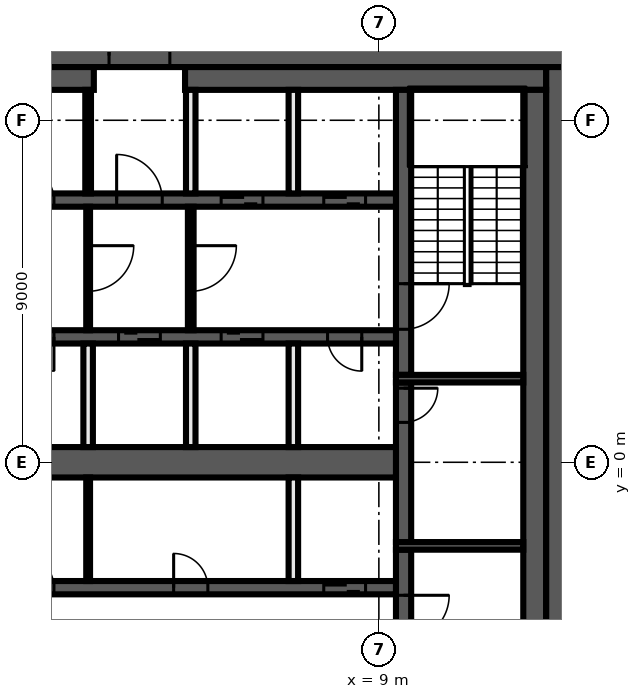
"""IFC4 building model, lengths in metres.
Left out: names, types, materials, properties, quantities, classifications, styles, units other than length and angle.
Written with IfcOpenShell. Run it as: python <this file> out.ifc"""

import sys

from ifc_helpers import new_model, si_unit, direction, frame, frame_2d, origin, place, context, subcontext, project, spatial, rectangle, extrude, element, fill, save


model = new_model("IFC4")
c1 = context("Model", 3, precision=1e-05, world=origin(), true_north=direction((0.0, 1.0)))
c2 = subcontext(c1, "Body", "Model", "MODEL_VIEW")
j1 = project(units=[si_unit("LENGTHUNIT", "METRE"), si_unit("PLANEANGLEUNIT", "RADIAN")], contexts=[c1])
p1 = place(None, origin())
s1 = spatial("IfcSite", under=j1, at=p1, CompositionType="ELEMENT")
p2 = place(p1, origin())
s2 = spatial("IfcBuilding", under=s1, at=p2, CompositionType="ELEMENT")
p3 = place(p2, frame((0.0, 0.0, 340.4)))
s3 = spatial("IfcBuildingStorey", under=s2, at=p3, CompositionType="ELEMENT", Elevation=340.4)
p4 = place(p3, frame((-14.0, 10.7, 0.0), z_axis=(0.0, 0.0, 1.0), x_axis=(1.0, 0.0, 0.0)))
e1 = element("IfcWall", 1, at=p4, inside=s3, PredefinedType="SHEAR", context=c2, shape_type="SweptSolid", body=[
    extrude(rectangle(XDim=28.0, YDim=0.6, at=frame_2d((14.0, 0.0))), origin(), (0.0, 0.0, 1.0), 3.82),
])
p5 = place(p4, frame((15.9, 0.0, 0.0)))
e2 = element("IfcOpeningElement", 2, at=p5, cuts=e1, PredefinedType="OPENING", context=c2, shape_type="SweptSolid", body=[
    extrude(rectangle(XDim=1.6, YDim=2.1, at=frame_2d((0.8, 1.05))), frame((0.0, 0.31, 0.0), z_axis=(0.0, -1.0, 0.0), x_axis=(1.0, 0.0, 0.0)), (0.0, 0.0, 1.0), 0.62),
])
p6 = place(p3, frame((13.7, 10.4, 0.0), z_axis=(0.0, 0.0, 1.0), x_axis=(0.0, -1.0, 0.0)))
e3 = element("IfcWall", 3, at=p6, inside=s3, PredefinedType="SHEAR", context=c2, shape_type="SweptSolid", body=[
    extrude(rectangle(XDim=20.8, YDim=0.6, at=frame_2d((10.4, 0.0))), origin(), (0.0, 0.0, 1.0), 3.82),
])
p7 = place(p3, frame((-13.4, 10.1, 0.0), z_axis=(0.0, 0.0, 1.0), x_axis=(1.0, 0.0, 0.0)))
e4 = element("IfcWall", 4, at=p7, inside=s3, PredefinedType="SHEAR", context=c2, shape_type="SweptSolid", body=[
    extrude(rectangle(XDim=14.9, YDim=0.6, at=frame_2d((7.45, 0.0))), origin(), (0.0, 0.0, 1.0), 3.82),
])
p8 = place(p3, frame((3.9, 10.1, 0.0), z_axis=(0.0, 0.0, 1.0), x_axis=(1.0, 0.0, 0.0)))
e5 = element("IfcWall", 5, at=p8, inside=s3, PredefinedType="SHEAR", context=c2, shape_type="SweptSolid", body=[
    extrude(rectangle(XDim=9.5, YDim=0.6, at=frame_2d((4.75, 0.0))), origin(), (0.0, 0.0, 1.0), 3.82),
])
p9 = place(p3, frame((13.1, 9.8, 0.0), z_axis=(0.0, 0.0, 1.0), x_axis=(0.0, -1.0, 0.0)))
e6 = element("IfcWall", 6, at=p9, inside=s3, PredefinedType="SHEAR", context=c2, shape_type="SweptSolid", body=[
    extrude(rectangle(XDim=19.6, YDim=0.6, at=frame_2d((9.8, 0.0))), origin(), (0.0, 0.0, 1.0), 3.82),
])
p10 = place(p3, frame((9.65, -2.3, 0.0), z_axis=(0.0, 0.0, 1.0), x_axis=(0.0, -1.0, 0.0)))
e7 = element("IfcWall", 7, at=p10, inside=s3, PredefinedType="SHEAR", context=c2, shape_type="SweptSolid", body=[
    extrude(rectangle(XDim=7.5, YDim=0.4, at=frame_2d((3.75, 0.0))), origin(), (0.0, 0.0, 1.0), 3.82),
])
p11 = place(p10, frame((1.2, 0.0, 0.0)))
e8 = element("IfcOpeningElement", 8, at=p11, cuts=e7, PredefinedType="OPENING", context=c2, shape_type="SweptSolid", body=[
    extrude(rectangle(XDim=1.2, YDim=2.1, at=frame_2d((0.6, 1.05))), frame((0.0, 0.21, 0.0), z_axis=(0.0, -1.0, 0.0), x_axis=(1.0, 0.0, 0.0)), (0.0, 0.0, 1.0), 0.42),
])
p12 = place(p3, frame((9.65, 2.1, 0.0), z_axis=(0.0, 0.0, 1.0), x_axis=(0.0, -1.0, 0.0)))
e9 = element("IfcWall", 9, at=p12, inside=s3, PredefinedType="SHEAR", context=c2, shape_type="SweptSolid", body=[
    extrude(rectangle(XDim=4.2, YDim=0.4, at=frame_2d((2.1, 0.0))), origin(), (0.0, 0.0, 1.0), 3.82),
])
p13 = place(p12, frame((0.15, 0.0, 0.0)))
e10 = element("IfcOpeningElement", 10, at=p13, cuts=e9, PredefinedType="OPENING", context=c2, shape_type="SweptSolid", body=[
    extrude(rectangle(XDim=0.9, YDim=2.1, at=frame_2d((0.45, 1.05))), frame((0.0, 0.21, 0.0), z_axis=(0.0, -1.0, 0.0), x_axis=(1.0, 0.0, 0.0)), (0.0, 0.0, 1.0), 0.42),
])
p14 = place(p3, frame((9.65, 9.8, 0.0), z_axis=(0.0, 0.0, 1.0), x_axis=(0.0, -1.0, 0.0)))
e11 = element("IfcWall", 11, at=p14, inside=s3, PredefinedType="SHEAR", context=c2, shape_type="SweptSolid", body=[
    extrude(rectangle(XDim=7.5, YDim=0.4, at=frame_2d((3.75, 0.0))), origin(), (0.0, 0.0, 1.0), 3.82),
])
p15 = place(p14, frame((5.1, 0.0, 0.0)))
e12 = element("IfcOpeningElement", 12, at=p15, cuts=e11, PredefinedType="OPENING", context=c2, shape_type="SweptSolid", body=[
    extrude(rectangle(XDim=1.2, YDim=2.1, at=frame_2d((0.6, 1.05))), frame((0.0, 0.21, 0.0), z_axis=(0.0, -1.0, 0.0), x_axis=(1.0, 0.0, 0.0)), (0.0, 0.0, 1.0), 0.42),
])
for number, where, z_axis, x_axis in (
    (13, (9.45, 2.2, 0.0), (0.0, 0.0, 1.0), (1.0, 0.0, 0.0)),
    (14, (9.45, -2.2, 0.0), (0.0, 0.0, 1.0), (1.0, 0.0, 0.0)),
):
    element("IfcWall", number, at=place(p3, frame(where, z_axis=z_axis, x_axis=x_axis)), inside=s3, PredefinedType="SHEAR", context=c2, shape_type="SweptSolid", body=[
        extrude(rectangle(XDim=3.35, YDim=0.2, at=frame_2d((1.675, 0.0))), origin(), (0.0, 0.0, 1.0), 3.82),
    ])
p16 = place(p3, frame((-9.45, 6.9, 0.0), z_axis=(0.0, 0.0, 1.0), x_axis=(1.0, 0.0, 0.0)))
e15 = element("IfcWall", 15, at=p16, inside=s3, PredefinedType="SHEAR", context=c2, shape_type="SweptSolid", body=[
    extrude(rectangle(XDim=18.9, YDim=0.35, at=frame_2d((9.45, 0.0))), origin(), (0.0, 0.0, 1.0), 3.82),
])
p17 = place(p16, frame((11.55, 0.0, 0.0)))
e16 = element("IfcOpeningElement", 16, at=p17, cuts=e15, PredefinedType="OPENING", context=c2, shape_type="SweptSolid", body=[
    extrude(rectangle(XDim=1.2, YDim=2.1, at=frame_2d((0.6, 1.05))), frame((0.0, 0.185, 0.0), z_axis=(0.0, -1.0, 0.0), x_axis=(1.0, 0.0, 0.0)), (0.0, 0.0, 1.0), 0.37),
])
p18 = place(p16, frame((14.3, 0.0, 0.0)))
e17 = element("IfcOpeningElement", 17, at=p18, cuts=e15, PredefinedType="OPENING", context=c2, shape_type="SweptSolid", body=[
    extrude(rectangle(XDim=1.1, YDim=2.1, at=frame_2d((0.55, 1.05))), frame((0.0, 0.185, 0.0), z_axis=(0.0, -1.0, 0.0), x_axis=(1.0, 0.0, 0.0)), (0.0, 0.0, 1.0), 0.37),
])
p19 = place(p16, frame((17.0, 0.0, 0.0)))
e18 = element("IfcOpeningElement", 18, at=p19, cuts=e15, PredefinedType="OPENING", context=c2, shape_type="SweptSolid", body=[
    extrude(rectangle(XDim=1.1, YDim=2.1, at=frame_2d((0.55, 1.05))), frame((0.0, 0.185, 0.0), z_axis=(0.0, -1.0, 0.0), x_axis=(1.0, 0.0, 0.0)), (0.0, 0.0, 1.0), 0.37),
])
p20 = place(p16, frame((3.6, 0.0, 0.0)))
e19 = element("IfcOpeningElement", 19, at=p20, cuts=e15, PredefinedType="OPENING", context=c2, shape_type="SweptSolid", body=[
    extrude(rectangle(XDim=0.9, YDim=2.1, at=frame_2d((0.45, 1.05))), frame((0.0, 0.185, 0.0), z_axis=(0.0, -1.0, 0.0), x_axis=(1.0, 0.0, 0.0)), (0.0, 0.0, 1.0), 0.37),
])
p21 = place(p16, frame((9.0, 0.0, 0.0)))
e20 = element("IfcOpeningElement", 20, at=p21, cuts=e15, PredefinedType="OPENING", context=c2, shape_type="SweptSolid", body=[
    extrude(rectangle(XDim=0.9, YDim=2.1, at=frame_2d((0.45, 1.05))), frame((0.0, 0.185, 0.0), z_axis=(0.0, -1.0, 0.0), x_axis=(1.0, 0.0, 0.0)), (0.0, 0.0, 1.0), 0.37),
])
p22 = place(p3, frame((9.45, 3.3, 0.0), z_axis=(0.0, 0.0, 1.0), x_axis=(-1.0, 0.0, 0.0)))
e21 = element("IfcWall", 21, at=p22, inside=s3, PredefinedType="SHEAR", context=c2, shape_type="SweptSolid", body=[
    extrude(rectangle(XDim=18.9, YDim=0.35, at=frame_2d((9.45, 0.0))), origin(), (0.0, 0.0, 1.0), 3.82),
])
p23 = place(p22, frame((6.2, 0.0, 0.0)))
e22 = element("IfcOpeningElement", 22, at=p23, cuts=e21, PredefinedType="OPENING", context=c2, shape_type="SweptSolid", body=[
    extrude(rectangle(XDim=1.1, YDim=2.1, at=frame_2d((0.55, 1.05))), frame((0.0, 0.185, 0.0), z_axis=(0.0, -1.0, 0.0), x_axis=(1.0, 0.0, 0.0)), (0.0, 0.0, 1.0), 0.37),
])
p24 = place(p22, frame((3.5, 0.0, 0.0)))
e23 = element("IfcOpeningElement", 23, at=p24, cuts=e21, PredefinedType="OPENING", context=c2, shape_type="SweptSolid", body=[
    extrude(rectangle(XDim=1.1, YDim=2.1, at=frame_2d((0.55, 1.05))), frame((0.0, 0.185, 0.0), z_axis=(0.0, -1.0, 0.0), x_axis=(1.0, 0.0, 0.0)), (0.0, 0.0, 1.0), 0.37),
])
p25 = place(p22, frame((0.9, 0.0, 0.0)))
e24 = element("IfcOpeningElement", 24, at=p25, cuts=e21, PredefinedType="OPENING", context=c2, shape_type="SweptSolid", body=[
    extrude(rectangle(XDim=0.9, YDim=2.1, at=frame_2d((0.45, 1.05))), frame((0.0, 0.185, 0.0), z_axis=(0.0, -1.0, 0.0), x_axis=(1.0, 0.0, 0.0)), (0.0, 0.0, 1.0), 0.37),
])
p26 = place(p22, frame((17.1, 0.0, 0.0)))
e25 = element("IfcOpeningElement", 25, at=p26, cuts=e21, PredefinedType="OPENING", context=c2, shape_type="SweptSolid", body=[
    extrude(rectangle(XDim=0.9, YDim=2.1, at=frame_2d((0.45, 1.05))), frame((0.0, 0.185, 0.0), z_axis=(0.0, -1.0, 0.0), x_axis=(1.0, 0.0, 0.0)), (0.0, 0.0, 1.0), 0.37),
])
p27 = place(p22, frame((14.4, 0.0, 0.0)))
e26 = element("IfcOpeningElement", 26, at=p27, cuts=e21, PredefinedType="OPENING", context=c2, shape_type="SweptSolid", body=[
    extrude(rectangle(XDim=0.9, YDim=2.1, at=frame_2d((0.45, 1.05))), frame((0.0, 0.185, 0.0), z_axis=(0.0, -1.0, 0.0), x_axis=(1.0, 0.0, 0.0)), (0.0, 0.0, 1.0), 0.37),
])
p28 = place(p22, frame((11.7, 0.0, 0.0)))
e27 = element("IfcOpeningElement", 27, at=p28, cuts=e21, PredefinedType="OPENING", context=c2, shape_type="SweptSolid", body=[
    extrude(rectangle(XDim=0.9, YDim=2.1, at=frame_2d((0.45, 1.05))), frame((0.0, 0.185, 0.0), z_axis=(0.0, -1.0, 0.0), x_axis=(1.0, 0.0, 0.0)), (0.0, 0.0, 1.0), 0.37),
])
p29 = place(p22, frame((9.0, 0.0, 0.0)))
e28 = element("IfcOpeningElement", 28, at=p29, cuts=e21, PredefinedType="OPENING", context=c2, shape_type="SweptSolid", body=[
    extrude(rectangle(XDim=0.9, YDim=2.1, at=frame_2d((0.45, 1.05))), frame((0.0, 0.185, 0.0), z_axis=(0.0, -1.0, 0.0), x_axis=(1.0, 0.0, 0.0)), (0.0, 0.0, 1.0), 0.37),
])
p30 = place(p3, frame((-9.45, -3.3, 0.0), z_axis=(0.0, 0.0, 1.0), x_axis=(1.0, 0.0, 0.0)))
e29 = element("IfcWall", 29, at=p30, inside=s3, PredefinedType="SHEAR", context=c2, shape_type="SweptSolid", body=[
    extrude(rectangle(XDim=18.9, YDim=0.35, at=frame_2d((9.45, 0.0))), origin(), (0.0, 0.0, 1.0), 3.82),
])
p31 = place(p30, frame((17.0, 0.0, 0.0)))
e30 = element("IfcOpeningElement", 30, at=p31, cuts=e29, PredefinedType="OPENING", context=c2, shape_type="SweptSolid", body=[
    extrude(rectangle(XDim=1.1, YDim=2.1, at=frame_2d((0.55, 1.05))), frame((0.0, 0.185, 0.0), z_axis=(0.0, -1.0, 0.0), x_axis=(1.0, 0.0, 0.0)), (0.0, 0.0, 1.0), 0.37),
])
p32 = place(p30, frame((0.9, 0.0, 0.0)))
e31 = element("IfcOpeningElement", 31, at=p32, cuts=e29, PredefinedType="OPENING", context=c2, shape_type="SweptSolid", body=[
    extrude(rectangle(XDim=0.9, YDim=2.1, at=frame_2d((0.45, 1.05))), frame((0.0, 0.185, 0.0), z_axis=(0.0, -1.0, 0.0), x_axis=(1.0, 0.0, 0.0)), (0.0, 0.0, 1.0), 0.37),
])
p33 = place(p30, frame((4.95, 0.0, 0.0)))
e32 = element("IfcOpeningElement", 32, at=p33, cuts=e29, PredefinedType="OPENING", context=c2, shape_type="SweptSolid", body=[
    extrude(rectangle(XDim=0.9, YDim=2.1, at=frame_2d((0.45, 1.05))), frame((0.0, 0.185, 0.0), z_axis=(0.0, -1.0, 0.0), x_axis=(1.0, 0.0, 0.0)), (0.0, 0.0, 1.0), 0.37),
])
p34 = place(p30, frame((9.0, 0.0, 0.0)))
e33 = element("IfcOpeningElement", 33, at=p34, cuts=e29, PredefinedType="OPENING", context=c2, shape_type="SweptSolid", body=[
    extrude(rectangle(XDim=0.9, YDim=2.1, at=frame_2d((0.45, 1.05))), frame((0.0, 0.185, 0.0), z_axis=(0.0, -1.0, 0.0), x_axis=(1.0, 0.0, 0.0)), (0.0, 0.0, 1.0), 0.37),
])
p35 = place(p30, frame((13.05, 0.0, 0.0)))
e34 = element("IfcOpeningElement", 34, at=p35, cuts=e29, PredefinedType="OPENING", context=c2, shape_type="SweptSolid", body=[
    extrude(rectangle(XDim=0.9, YDim=2.1, at=frame_2d((0.45, 1.05))), frame((0.0, 0.185, 0.0), z_axis=(0.0, -1.0, 0.0), x_axis=(1.0, 0.0, 0.0)), (0.0, 0.0, 1.0), 0.37),
])
p36 = place(p3, frame((-9.45, 0.0, 0.0), z_axis=(0.0, 0.0, 1.0), x_axis=(1.0, 0.0, 0.0)))
e35 = element("IfcWall", 35, at=p36, inside=s3, PredefinedType="SHEAR", context=c2, shape_type="SweptSolid", body=[
    extrude(rectangle(XDim=18.9, YDim=0.8, at=frame_2d((9.45, 0.0))), origin(), (0.0, 0.0, 1.0), 3.82),
])
for number, where, z_axis, x_axis in (
    (36, (6.75, -3.125, 0.0), (0.0, 0.0, 1.0), (0.0, 1.0, 0.0)),
    (37, (6.75, 0.4, 0.0), (0.0, 0.0, 1.0), (0.0, 1.0, 0.0)),
    (38, (6.75, 7.075, 0.0), (0.0, 0.0, 1.0), (0.0, 1.0, 0.0)),
):
    element("IfcWall", number, at=place(p3, frame(where, z_axis=z_axis, x_axis=x_axis)), inside=s3, PredefinedType="SOLIDWALL", context=c2, shape_type="SweptSolid", body=[
        extrude(rectangle(XDim=2.725, YDim=0.25, at=frame_2d((1.363, 0.0))), origin(), (0.0, 0.0, 1.0), 3.82),
    ])
p37 = place(p3, frame((4.05, 6.725, 0.0), z_axis=(0.0, 0.0, 1.0), x_axis=(0.0, -1.0, 0.0)))
e39 = element("IfcWall", 39, at=p37, inside=s3, PredefinedType="PARTITIONING", context=c2, shape_type="SweptSolid", body=[
    extrude(rectangle(XDim=3.25, YDim=0.15, at=frame_2d((1.625, 0.0))), origin(), (0.0, 0.0, 1.0), 3.82),
])
p38 = place(p37, frame((1.025, 0.0, 0.0)))
e40 = element("IfcOpeningElement", 40, at=p38, cuts=e39, PredefinedType="OPENING", context=c2, shape_type="SweptSolid", body=[
    extrude(rectangle(XDim=1.2, YDim=2.1, at=frame_2d((0.6, 1.05))), frame((0.0, 0.085, 0.0), z_axis=(0.0, -1.0, 0.0), x_axis=(1.0, 0.0, 0.0)), (0.0, 0.0, 1.0), 0.17),
])
for number, where, z_axis, x_axis in (
    (41, (4.05, 0.4, 0.0), (0.0, 0.0, 1.0), (0.0, 1.0, 0.0)),
    (42, (4.05, 7.075, 0.0), (0.0, 0.0, 1.0), (0.0, 1.0, 0.0)),
):
    element("IfcWall", number, at=place(p3, frame(where, z_axis=z_axis, x_axis=x_axis)), inside=s3, PredefinedType="SOLIDWALL", context=c2, shape_type="SweptSolid", body=[
        extrude(rectangle(XDim=2.725, YDim=0.25, at=frame_2d((1.363, 0.0))), origin(), (0.0, 0.0, 1.0), 3.82),
    ])
p39 = place(p3, frame((1.35, 7.075, 0.0), z_axis=(0.0, 0.0, 1.0), x_axis=(0.0, 1.0, 0.0)))
e43 = element("IfcWall", 43, at=p39, inside=s3, PredefinedType="PARTITIONING", context=c2, shape_type="SweptSolid", body=[
    extrude(rectangle(XDim=2.725, YDim=0.15, at=frame_2d((1.363, 0.0))), origin(), (0.0, 0.0, 1.0), 3.82),
])
p40 = place(p3, frame((1.35, -3.125, 0.0), z_axis=(0.0, 0.0, 1.0), x_axis=(0.0, 1.0, 0.0)))
e44 = element("IfcWall", 44, at=p40, inside=s3, PredefinedType="PARTITIONING", context=c2, shape_type="SweptSolid", body=[
    extrude(rectangle(XDim=2.725, YDim=0.1, at=frame_2d((1.363, 0.0))), origin(), (0.0, 0.0, 1.0), 3.82),
])
p41 = place(p3, frame((1.35, 6.725, 0.0), z_axis=(0.0, 0.0, 1.0), x_axis=(0.0, -1.0, 0.0)))
e45 = element("IfcWall", 45, at=p41, inside=s3, PredefinedType="PARTITIONING", context=c2, shape_type="SweptSolid", body=[
    extrude(rectangle(XDim=3.25, YDim=0.1, at=frame_2d((1.625, 0.0))), origin(), (0.0, 0.0, 1.0), 3.82),
])
p42 = place(p41, frame((1.025, 0.0, 0.0)))
e46 = element("IfcOpeningElement", 46, at=p42, cuts=e45, PredefinedType="OPENING", context=c2, shape_type="SweptSolid", body=[
    extrude(rectangle(XDim=1.2, YDim=2.1, at=frame_2d((0.6, 1.05))), frame((0.0, 0.06, 0.0), z_axis=(0.0, -1.0, 0.0), x_axis=(1.0, 0.0, 0.0)), (0.0, 0.0, 1.0), 0.12),
])
p43 = place(p3, frame((1.35, 0.4, 0.0), z_axis=(0.0, 0.0, 1.0), x_axis=(0.0, 1.0, 0.0)))
e47 = element("IfcWall", 47, at=p43, inside=s3, PredefinedType="SOLIDWALL", context=c2, shape_type="SweptSolid", body=[
    extrude(rectangle(XDim=2.725, YDim=0.25, at=frame_2d((1.363, 0.0))), origin(), (0.0, 0.0, 1.0), 3.82),
])
p44 = place(p13, origin())
e48 = element("IfcDoor", 48, at=p44, inside=s3, OperationType="SINGLE_SWING_RIGHT", PredefinedType="DOOR", context=c2, shape_type="SweptSolid", body=[
    extrude(rectangle(XDim=0.9, YDim=2.1, at=frame_2d((0.45, 1.05))), frame((0.0, 0.025, 0.0), z_axis=(0.0, -1.0, 0.0), x_axis=(1.0, 0.0, 0.0)), (0.0, 0.0, 1.0), 0.05),
])
fill(e10, e48)
p45 = place(p5, origin())
e49 = element("IfcDoor", 49, at=p45, inside=s3, OperationType="DOUBLE_DOOR_SINGLE_SWING", PredefinedType="DOOR", context=c2, shape_type="SweptSolid", body=[
    extrude(rectangle(XDim=1.6, YDim=2.1, at=frame_2d((0.8, 1.05))), frame((0.0, 0.025, 0.0), z_axis=(0.0, -1.0, 0.0), x_axis=(1.0, 0.0, 0.0)), (0.0, 0.0, 1.0), 0.05),
])
fill(e2, e49)
p46 = place(p17, origin())
e50 = element("IfcDoor", 50, at=p46, inside=s3, OperationType="SINGLE_SWING_LEFT", PredefinedType="DOOR", context=c2, shape_type="SweptSolid", body=[
    extrude(rectangle(XDim=1.2, YDim=2.1, at=frame_2d((0.6, 1.05))), frame((0.0, 0.025, 0.0), z_axis=(0.0, -1.0, 0.0), x_axis=(1.0, 0.0, 0.0)), (0.0, 0.0, 1.0), 0.05),
])
fill(e16, e50)
p47 = place(p18, origin())
e51 = element("IfcDoor", 51, at=p47, inside=s3, OperationType="DOUBLE_DOOR_SLIDING", PredefinedType="DOOR", context=c2, shape_type="SweptSolid", body=[
    extrude(rectangle(XDim=1.1, YDim=2.1, at=frame_2d((0.55, 1.05))), frame((0.0, 0.025, 0.0), z_axis=(0.0, -1.0, 0.0), x_axis=(1.0, 0.0, 0.0)), (0.0, 0.0, 1.0), 0.05),
])
fill(e17, e51)
p48 = place(p19, origin())
e52 = element("IfcDoor", 52, at=p48, inside=s3, OperationType="DOUBLE_DOOR_SLIDING", PredefinedType="DOOR", context=c2, shape_type="SweptSolid", body=[
    extrude(rectangle(XDim=1.1, YDim=2.1, at=frame_2d((0.55, 1.05))), frame((0.0, 0.025, 0.0), z_axis=(0.0, -1.0, 0.0), x_axis=(1.0, 0.0, 0.0)), (0.0, 0.0, 1.0), 0.05),
])
fill(e18, e52)
p49 = place(p23, origin())
e53 = element("IfcDoor", 53, at=p49, inside=s3, OperationType="DOUBLE_DOOR_SLIDING", PredefinedType="DOOR", context=c2, shape_type="SweptSolid", body=[
    extrude(rectangle(XDim=1.1, YDim=2.1, at=frame_2d((0.55, 1.05))), frame((0.0, 0.025, 0.0), z_axis=(0.0, -1.0, 0.0), x_axis=(1.0, 0.0, 0.0)), (0.0, 0.0, 1.0), 0.05),
])
fill(e22, e53)
p50 = place(p24, origin())
e54 = element("IfcDoor", 54, at=p50, inside=s3, OperationType="DOUBLE_DOOR_SLIDING", PredefinedType="DOOR", context=c2, shape_type="SweptSolid", body=[
    extrude(rectangle(XDim=1.1, YDim=2.1, at=frame_2d((0.55, 1.05))), frame((0.0, 0.025, 0.0), z_axis=(0.0, -1.0, 0.0), x_axis=(1.0, 0.0, 0.0)), (0.0, 0.0, 1.0), 0.05),
])
fill(e23, e54)
p51 = place(p25, origin())
e55 = element("IfcDoor", 55, at=p51, inside=s3, OperationType="SINGLE_SWING_LEFT", PredefinedType="DOOR", context=c2, shape_type="SweptSolid", body=[
    extrude(rectangle(XDim=0.9, YDim=2.1, at=frame_2d((0.45, 1.05))), frame((0.0, 0.025, 0.0), z_axis=(0.0, -1.0, 0.0), x_axis=(1.0, 0.0, 0.0)), (0.0, 0.0, 1.0), 0.05),
])
fill(e24, e55)
p52 = place(p31, origin())
e56 = element("IfcDoor", 56, at=p52, inside=s3, OperationType="DOUBLE_DOOR_SLIDING", PredefinedType="DOOR", context=c2, shape_type="SweptSolid", body=[
    extrude(rectangle(XDim=1.1, YDim=2.1, at=frame_2d((0.55, 1.05))), frame((0.0, 0.025, 0.0), z_axis=(0.0, -1.0, 0.0), x_axis=(1.0, 0.0, 0.0)), (0.0, 0.0, 1.0), 0.05),
])
fill(e30, e56)
p53 = place(p21, origin())
e57 = element("IfcDoor", 57, at=p53, inside=s3, OperationType="SINGLE_SWING_LEFT", PredefinedType="DOOR", context=c2, shape_type="SweptSolid", body=[
    extrude(rectangle(XDim=0.9, YDim=2.1, at=frame_2d((0.45, 1.05))), frame((0.0, 0.025, 0.0), z_axis=(0.0, -1.0, 0.0), x_axis=(1.0, 0.0, 0.0)), (0.0, 0.0, 1.0), 0.05),
])
fill(e20, e57)
p54 = place(p29, origin())
e58 = element("IfcDoor", 58, at=p54, inside=s3, OperationType="SINGLE_SWING_LEFT", PredefinedType="DOOR", context=c2, shape_type="SweptSolid", body=[
    extrude(rectangle(XDim=0.9, YDim=2.1, at=frame_2d((0.45, 1.05))), frame((0.0, 0.025, 0.0), z_axis=(0.0, -1.0, 0.0), x_axis=(1.0, 0.0, 0.0)), (0.0, 0.0, 1.0), 0.05),
])
fill(e28, e58)
p55 = place(p34, origin())
e59 = element("IfcDoor", 59, at=p55, inside=s3, OperationType="SINGLE_SWING_RIGHT", PredefinedType="DOOR", context=c2, shape_type="SweptSolid", body=[
    extrude(rectangle(XDim=0.9, YDim=2.1, at=frame_2d((0.45, 1.05))), frame((0.0, 0.025, 0.0), z_axis=(0.0, -1.0, 0.0), x_axis=(1.0, 0.0, 0.0)), (0.0, 0.0, 1.0), 0.05),
])
fill(e33, e59)
p56 = place(p35, origin())
e60 = element("IfcDoor", 60, at=p56, inside=s3, OperationType="SINGLE_SWING_LEFT", PredefinedType="DOOR", context=c2, shape_type="SweptSolid", body=[
    extrude(rectangle(XDim=0.9, YDim=2.1, at=frame_2d((0.45, 1.05))), frame((0.0, 0.025, 0.0), z_axis=(0.0, -1.0, 0.0), x_axis=(1.0, 0.0, 0.0)), (0.0, 0.0, 1.0), 0.05),
])
fill(e34, e60)
p57 = place(p15, origin())
e61 = element("IfcDoor", 61, at=p57, inside=s3, OperationType="SINGLE_SWING_LEFT", PredefinedType="DOOR", context=c2, shape_type="SweptSolid", body=[
    extrude(rectangle(XDim=1.2, YDim=2.1, at=frame_2d((0.6, 1.05))), frame((0.0, 0.025, 0.0), z_axis=(0.0, -1.0, 0.0), x_axis=(1.0, 0.0, 0.0)), (0.0, 0.0, 1.0), 0.05),
])
fill(e12, e61)
p58 = place(p11, origin())
e62 = element("IfcDoor", 62, at=p58, inside=s3, OperationType="SINGLE_SWING_RIGHT", PredefinedType="DOOR", context=c2, shape_type="SweptSolid", body=[
    extrude(rectangle(XDim=1.2, YDim=2.1, at=frame_2d((0.6, 1.05))), frame((0.0, 0.025, 0.0), z_axis=(0.0, -1.0, 0.0), x_axis=(1.0, 0.0, 0.0)), (0.0, 0.0, 1.0), 0.05),
])
fill(e8, e62)
p59 = place(p42, origin())
e63 = element("IfcDoor", 63, at=p59, inside=s3, OperationType="SINGLE_SWING_LEFT", PredefinedType="DOOR", context=c2, shape_type="SweptSolid", body=[
    extrude(rectangle(XDim=1.2, YDim=2.1, at=frame_2d((0.6, 1.05))), frame((0.0, 0.025, 0.0), z_axis=(0.0, -1.0, 0.0), x_axis=(1.0, 0.0, 0.0)), (0.0, 0.0, 1.0), 0.05),
])
fill(e46, e63)
p60 = place(p38, origin())
e64 = element("IfcDoor", 64, at=p60, inside=s3, OperationType="SINGLE_SWING_RIGHT", PredefinedType="DOOR", context=c2, shape_type="SweptSolid", body=[
    extrude(rectangle(XDim=1.2, YDim=2.1, at=frame_2d((0.6, 1.05))), frame((0.0, 0.025, 0.0), z_axis=(0.0, -1.0, 0.0), x_axis=(1.0, 0.0, 0.0)), (0.0, 0.0, 1.0), 0.05),
])
fill(e40, e64)
save(model, sys.argv[1])
